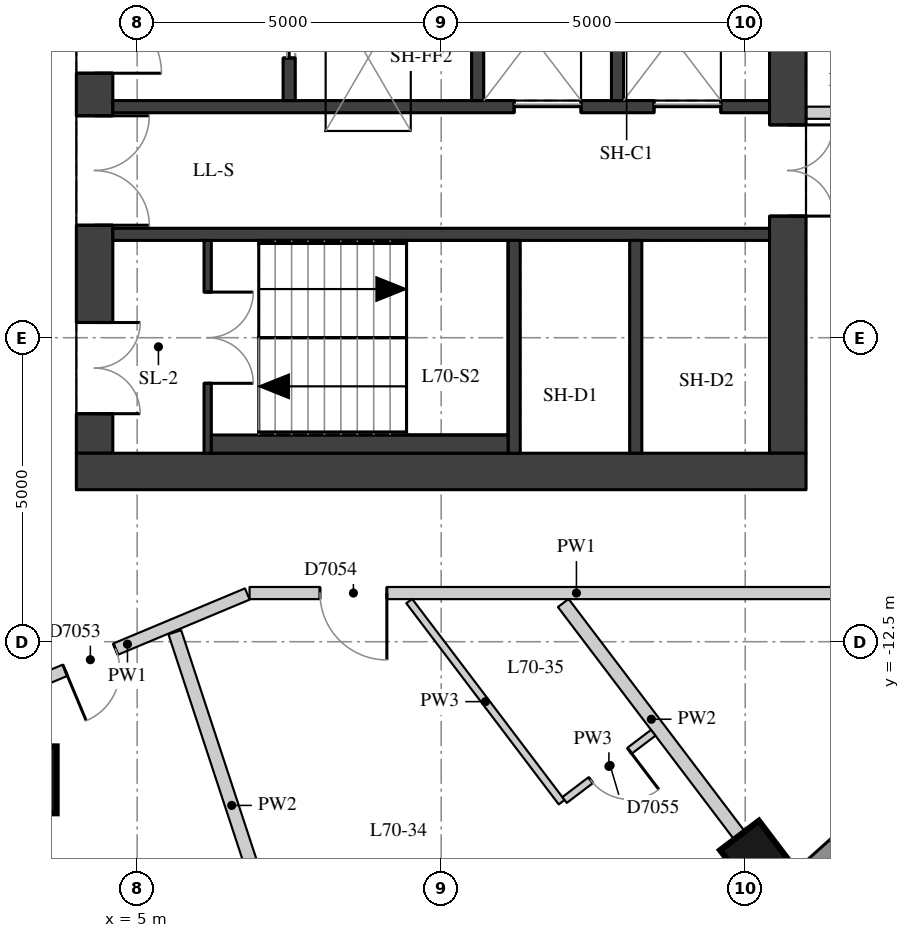
"""IFC4 building model, lengths in metres.
Left out: names, types, materials, properties, quantities, classifications, styles, units other than length and angle.
Written with IfcOpenShell. Run it as: python <this file> out.ifc"""

import sys

from ifc_helpers import new_model, si_unit, direction, frame, frame_2d, origin, origin_2d, place, context, subcontext, project, spatial, rectangle, extrude, element, fill, save


model = new_model("IFC4")
c1 = context("Model", 3, precision=1e-05, world=origin(), true_north=direction((0.0, 1.0)))
c2 = subcontext(c1, "Body", "Model", "MODEL_VIEW")
j1 = project(units=[si_unit("LENGTHUNIT", "METRE"), si_unit("PLANEANGLEUNIT", "RADIAN")], contexts=[c1])
p1 = place(None, origin())
s1 = spatial("IfcSite", under=j1, at=p1, CompositionType="ELEMENT")
p2 = place(p1, origin())
s2 = spatial("IfcBuilding", under=s1, at=p2, CompositionType="ELEMENT")
p3 = place(p2, frame((0.0, 0.0, 246.5)))
s3 = spatial("IfcBuildingStorey", under=s2, at=p3, CompositionType="ELEMENT", Elevation=246.5)
p4 = place(p3, frame((15.359, -16.285, 0.0), z_axis=(0.0, 0.0, 1.0), x_axis=(0.604020073066, -0.796969103123, 0.0)))
e1 = element("IfcColumn", 1, at=p4, inside=s3, PredefinedType="COLUMN", context=c2, shape_type="SweptSolid", body=[
    extrude(rectangle(XDim=1.5, YDim=0.8, at=origin_2d()), origin(), (0.0, 0.0, 1.0), 3.3),
])
p5 = place(p3, frame((3.126, -14.772, 0.0), z_axis=(0.0, 0.0, 1.0), x_axis=(1.0, 0.0, 0.0)))
e2 = element("IfcColumn", 2, at=p5, inside=s3, PredefinedType="COLUMN", context=c2, shape_type="SweptSolid", body=[
    extrude(rectangle(XDim=1.1, YDim=1.1, at=origin_2d()), origin(), (0.0, 0.0, 1.0), 3.3),
])
p6 = place(p3, frame((15.959, -16.448, 0.0), z_axis=(0.0, 0.0, 1.0), x_axis=(0.743166014219, 0.669107073128, 0.0)))
e3 = element("IfcWall", 3, at=p6, inside=s3, PredefinedType="SOLIDWALL", context=c2, shape_type="SweptSolid", body=[
    extrude(rectangle(XDim=3.316, YDim=0.45, at=frame_2d((1.658, 0.0))), origin(), (0.0, 0.0, 1.0), 3.02),
])
p7 = place(p3, frame((4.3, -9.4, 0.0), z_axis=(0.0, 0.0, 1.0), x_axis=(0.0, 1.0, 0.0)))
e4 = element("IfcWall", 4, at=p7, inside=s3, PredefinedType="SHEAR", context=c2, shape_type="SweptSolid", body=[
    extrude(rectangle(XDim=18.8, YDim=0.6, at=frame_2d((9.4, 0.0))), origin(), (0.0, 0.0, 1.0), 3.02),
])
p8 = place(p7, frame((0.65, 0.0, 0.0)))
e5 = element("IfcOpeningElement", 5, at=p8, cuts=e4, PredefinedType="OPENING", context=c2, shape_type="SweptSolid", body=[
    extrude(rectangle(XDim=1.5, YDim=2.1, at=frame_2d((0.75, 1.05))), frame((0.0, 0.31, 0.0), z_axis=(0.0, -1.0, 0.0), x_axis=(1.0, 0.0, 0.0)), (0.0, 0.0, 1.0), 0.62),
])
p9 = place(p7, frame((3.75, 0.0, 0.0)))
e6 = element("IfcOpeningElement", 6, at=p9, cuts=e4, PredefinedType="OPENING", context=c2, shape_type="SweptSolid", body=[
    extrude(rectangle(XDim=1.8, YDim=2.1, at=frame_2d((0.9, 1.05))), frame((0.0, 0.31, 0.0), z_axis=(0.0, -1.0, 0.0), x_axis=(1.0, 0.0, 0.0)), (0.0, 0.0, 1.0), 0.62),
])
p10 = place(p7, frame((6.25, 0.0, 0.0)))
e7 = element("IfcOpeningElement", 7, at=p10, cuts=e4, PredefinedType="OPENING", context=c2, shape_type="SweptSolid", body=[
    extrude(rectangle(XDim=1.1, YDim=2.1, at=frame_2d((0.55, 1.05))), frame((0.0, 0.31, 0.0), z_axis=(0.0, -1.0, 0.0), x_axis=(1.0, 0.0, 0.0)), (0.0, 0.0, 1.0), 0.62),
])
p11 = place(p7, frame((8.9, 0.0, 0.0)))
e8 = element("IfcOpeningElement", 8, at=p11, cuts=e4, PredefinedType="OPENING", context=c2, shape_type="SweptSolid", body=[
    extrude(rectangle(XDim=1.0, YDim=2.1, at=frame_2d((0.5, 1.05))), frame((0.0, 0.31, 0.0), z_axis=(0.0, -1.0, 0.0), x_axis=(1.0, 0.0, 0.0)), (0.0, 0.0, 1.0), 0.62),
])
p12 = place(p7, frame((11.45, 0.0, 0.0)))
e9 = element("IfcOpeningElement", 9, at=p12, cuts=e4, PredefinedType="OPENING", context=c2, shape_type="SweptSolid", body=[
    extrude(rectangle(XDim=1.1, YDim=2.1, at=frame_2d((0.55, 1.05))), frame((0.0, 0.31, 0.0), z_axis=(0.0, -1.0, 0.0), x_axis=(1.0, 0.0, 0.0)), (0.0, 0.0, 1.0), 0.62),
])
p13 = place(p7, frame((13.25, 0.0, 0.0)))
e10 = element("IfcOpeningElement", 10, at=p13, cuts=e4, PredefinedType="OPENING", context=c2, shape_type="SweptSolid", body=[
    extrude(rectangle(XDim=1.8, YDim=2.1, at=frame_2d((0.9, 1.05))), frame((0.0, 0.31, 0.0), z_axis=(0.0, -1.0, 0.0), x_axis=(1.0, 0.0, 0.0)), (0.0, 0.0, 1.0), 0.62),
])
p14 = place(p7, frame((16.65, 0.0, 0.0)))
e11 = element("IfcOpeningElement", 11, at=p14, cuts=e4, PredefinedType="OPENING", context=c2, shape_type="SweptSolid", body=[
    extrude(rectangle(XDim=1.5, YDim=2.1, at=frame_2d((0.75, 1.05))), frame((0.0, 0.31, 0.0), z_axis=(0.0, -1.0, 0.0), x_axis=(1.0, 0.0, 0.0)), (0.0, 0.0, 1.0), 0.62),
])
p15 = place(p3, frame((15.7, -9.4, 0.0), z_axis=(0.0, 0.0, 1.0), x_axis=(0.0, 1.0, 0.0)))
e12 = element("IfcWall", 12, at=p15, inside=s3, PredefinedType="SHEAR", context=c2, shape_type="SweptSolid", body=[
    extrude(rectangle(XDim=18.8, YDim=0.6, at=frame_2d((9.4, 0.0))), origin(), (0.0, 0.0, 1.0), 3.02),
])
p16 = place(p15, frame((13.4, 0.0, 0.0)))
e13 = element("IfcOpeningElement", 13, at=p16, cuts=e12, PredefinedType="OPENING", context=c2, shape_type="SweptSolid", body=[
    extrude(rectangle(XDim=1.5, YDim=2.1, at=frame_2d((0.75, 1.05))), frame((0.0, 0.31, 0.0), z_axis=(0.0, -1.0, 0.0), x_axis=(1.0, 0.0, 0.0)), (0.0, 0.0, 1.0), 0.62),
])
p17 = place(p15, frame((3.9, 0.0, 0.0)))
e14 = element("IfcOpeningElement", 14, at=p17, cuts=e12, PredefinedType="OPENING", context=c2, shape_type="SweptSolid", body=[
    extrude(rectangle(XDim=1.5, YDim=2.1, at=frame_2d((0.75, 1.05))), frame((0.0, 0.31, 0.0), z_axis=(0.0, -1.0, 0.0), x_axis=(1.0, 0.0, 0.0)), (0.0, 0.0, 1.0), 0.62),
])
p18 = place(p3, frame((4.0, -9.7, 0.0), z_axis=(0.0, 0.0, 1.0), x_axis=(1.0, 0.0, 0.0)))
e15 = element("IfcWall", 15, at=p18, inside=s3, PredefinedType="SHEAR", context=c2, shape_type="SweptSolid", body=[
    extrude(rectangle(XDim=12.0, YDim=0.6, at=frame_2d((6.0, 0.0))), origin(), (0.0, 0.0, 1.0), 3.02),
])
p19 = place(p3, frame((4.6, -3.7, 0.0), z_axis=(0.0, 0.0, 1.0), x_axis=(1.0, 0.0, 0.0)))
e16 = element("IfcWall", 16, at=p19, inside=s3, PredefinedType="SHEAR", context=c2, shape_type="SweptSolid", body=[
    extrude(rectangle(XDim=10.8, YDim=0.2, at=frame_2d((5.4, 0.0))), origin(), (0.0, 0.0, 1.0), 3.02),
])
p20 = place(p19, frame((6.6, 0.0, 0.0)))
e17 = element("IfcOpeningElement", 17, at=p20, cuts=e16, PredefinedType="OPENING", context=c2, shape_type="SweptSolid", body=[
    extrude(rectangle(XDim=1.1, YDim=2.1, at=frame_2d((0.55, 1.05))), frame((0.0, 0.11, 0.0), z_axis=(0.0, -1.0, 0.0), x_axis=(1.0, 0.0, 0.0)), (0.0, 0.0, 1.0), 0.22),
])
p21 = place(p19, frame((8.9, 0.0, 0.0)))
e18 = element("IfcOpeningElement", 18, at=p21, cuts=e16, PredefinedType="OPENING", context=c2, shape_type="SweptSolid", body=[
    extrude(rectangle(XDim=1.1, YDim=2.1, at=frame_2d((0.55, 1.05))), frame((0.0, 0.11, 0.0), z_axis=(0.0, -1.0, 0.0), x_axis=(1.0, 0.0, 0.0)), (0.0, 0.0, 1.0), 0.22),
])
p22 = place(p3, frame((4.6, -5.8, 0.0), z_axis=(0.0, 0.0, 1.0), x_axis=(1.0, 0.0, 0.0)))
e19 = element("IfcWall", 19, at=p22, inside=s3, PredefinedType="SHEAR", context=c2, shape_type="SweptSolid", body=[
    extrude(rectangle(XDim=10.8, YDim=0.2, at=frame_2d((5.4, 0.0))), origin(), (0.0, 0.0, 1.0), 3.02),
])
for number, where, z_axis, x_axis in (
    (20, (11.2, -9.4, 0.0), (0.0, 0.0, 1.0), (0.0, 1.0, 0.0)),
    (21, (13.2, -9.4, 0.0), (0.0, 0.0, 1.0), (0.0, 1.0, 0.0)),
):
    element("IfcWall", number, at=place(p3, frame(where, z_axis=z_axis, x_axis=x_axis)), inside=s3, PredefinedType="SHEAR", context=c2, shape_type="SweptSolid", body=[
        extrude(rectangle(XDim=3.5, YDim=0.2, at=frame_2d((1.75, 0.0))), origin(), (0.0, 0.0, 1.0), 3.02),
    ])
p23 = place(p3, frame((7.5, -3.6, 0.0), z_axis=(0.0, 0.0, 1.0), x_axis=(0.0, 1.0, 0.0)))
e22 = element("IfcWall", 22, at=p23, inside=s3, PredefinedType="SHEAR", context=c2, shape_type="SweptSolid", body=[
    extrude(rectangle(XDim=2.5, YDim=0.2, at=frame_2d((1.25, 0.0))), origin(), (0.0, 0.0, 1.0), 3.02),
])
p24 = place(p23, frame((0.7, 0.0, 0.0)))
e23 = element("IfcOpeningElement", 23, at=p24, cuts=e22, PredefinedType="OPENING", context=c2, shape_type="SweptSolid", body=[
    extrude(rectangle(XDim=1.1, YDim=2.1, at=frame_2d((0.55, 1.05))), frame((0.0, 0.11, 0.0), z_axis=(0.0, -1.0, 0.0), x_axis=(1.0, 0.0, 0.0)), (0.0, 0.0, 1.0), 0.22),
])
for number, where, z_axis, x_axis in (
    (24, (10.6, -3.6, 0.0), (0.0, 0.0, 1.0), (0.0, 1.0, 0.0)),
    (25, (12.9, -3.6, 0.0), (0.0, 0.0, 1.0), (0.0, 1.0, 0.0)),
):
    element("IfcWall", number, at=place(p3, frame(where, z_axis=z_axis, x_axis=x_axis)), inside=s3, PredefinedType="SHEAR", context=c2, shape_type="SweptSolid", body=[
        extrude(rectangle(XDim=2.5, YDim=0.2, at=frame_2d((1.25, 0.0))), origin(), (0.0, 0.0, 1.0), 3.02),
    ])
p25 = place(p3, frame((6.16, -9.4, 0.0), z_axis=(0.0, 0.0, 1.0), x_axis=(0.0, 1.0, 0.0)))
e26 = element("IfcWall", 26, at=p25, inside=s3, PredefinedType="SHEAR", context=c2, shape_type="SweptSolid", body=[
    extrude(rectangle(XDim=3.5, YDim=0.12, at=frame_2d((1.75, 0.0))), origin(), (0.0, 0.0, 1.0), 3.02),
])
p26 = place(p25, frame((1.15, 0.0, 0.0)))
e27 = element("IfcOpeningElement", 27, at=p26, cuts=e26, PredefinedType="OPENING", context=c2, shape_type="SweptSolid", body=[
    extrude(rectangle(XDim=1.5, YDim=2.1, at=frame_2d((0.75, 1.05))), frame((0.0, 0.07, 0.0), z_axis=(0.0, -1.0, 0.0), x_axis=(1.0, 0.0, 0.0)), (0.0, 0.0, 1.0), 0.14),
])
p27 = place(p3, frame((6.22, -9.25, 0.0), z_axis=(0.0, 0.0, 1.0), x_axis=(1.0, 0.0, 0.0)))
e28 = element("IfcWall", 28, at=p27, inside=s3, PredefinedType="PARTITIONING", context=c2, shape_type="SweptSolid", body=[
    extrude(rectangle(XDim=4.88, YDim=0.3, at=frame_2d((2.44, 0.0))), origin(), (0.0, 0.0, 1.0), 3.02),
])
p28 = place(p3, frame((17.6, -11.7, 0.0), z_axis=(0.0, 0.0, 1.0), x_axis=(-1.0, 0.0, 0.0)))
e29 = element("IfcWall", 29, at=p28, inside=s3, PredefinedType="PARTITIONING", context=c2, shape_type="SweptSolid", body=[
    extrude(rectangle(XDim=10.751, YDim=0.2, at=frame_2d((5.375, 0.0))), origin(), (0.0, 0.0, 1.0), 3.02),
])
p29 = place(p28, frame((8.493, 0.0, 0.0)))
e30 = element("IfcOpeningElement", 30, at=p29, cuts=e29, PredefinedType="OPENING", context=c2, shape_type="SweptSolid", body=[
    extrude(rectangle(XDim=1.1, YDim=2.1, at=frame_2d((0.55, 1.05))), frame((0.0, 0.11, 0.0), z_axis=(0.0, -1.0, 0.0), x_axis=(1.0, 0.0, 0.0)), (0.0, 0.0, 1.0), 0.22),
])
p30 = place(p3, frame((6.812, -11.716, 0.0), z_axis=(0.0, 0.0, 1.0), x_axis=(-0.922465594323, -0.386079301817, 0.0)))
e31 = element("IfcWall", 31, at=p30, inside=s3, PredefinedType="PARTITIONING", context=c2, shape_type="SweptSolid", body=[
    extrude(rectangle(XDim=4.273, YDim=0.2, at=frame_2d((2.137, 0.0))), origin(), (0.0, 0.0, 1.0), 3.02),
])
p31 = place(p30, frame((2.349, 0.0, 0.0)))
e32 = element("IfcOpeningElement", 32, at=p31, cuts=e31, PredefinedType="OPENING", context=c2, shape_type="SweptSolid", body=[
    extrude(rectangle(XDim=0.9, YDim=2.1, at=frame_2d((0.45, 1.05))), frame((0.0, 0.11, 0.0), z_axis=(0.0, -1.0, 0.0), x_axis=(1.0, 0.0, 0.0)), (0.0, 0.0, 1.0), 0.22),
])
p32 = place(p3, frame((16.004, -3.8, 0.0), z_axis=(0.0, 0.0, 1.0), x_axis=(1.0, 0.0, 0.0)))
e33 = element("IfcWall", 33, at=p32, inside=s3, PredefinedType="PARTITIONING", context=c2, shape_type="SweptSolid", body=[
    extrude(rectangle(XDim=1.596, YDim=0.2, at=frame_2d((0.798, 0.0))), origin(), (0.0, 0.0, 1.0), 2.57),
])
p33 = place(p3, frame((3.758, -18.944, 0.0), z_axis=(0.0, 0.0, 1.0), x_axis=(-0.157259396774, 0.987557331058, 0.0)))
e34 = element("IfcWall", 34, at=p33, inside=s3, PredefinedType="PARTITIONING", context=c2, shape_type="SweptSolid", body=[
    extrude(rectangle(XDim=5.549, YDim=0.22, at=frame_2d((2.774, 0.0))), origin(), (0.0, 0.0, 1.0), 2.57),
])
p34 = place(p3, frame((7.492, -18.04, 0.0), z_axis=(0.0, 0.0, 1.0), x_axis=(-0.312328122622, 0.949974285873, 0.0)))
e35 = element("IfcWall", 35, at=p34, inside=s3, PredefinedType="PARTITIONING", context=c2, shape_type="SweptSolid", body=[
    extrude(rectangle(XDim=5.996, YDim=0.22, at=frame_2d((2.998, 0.0))), origin(), (0.0, 0.0, 1.0), 3.02),
])
p35 = place(p3, frame((14.906, -15.687, 0.0), z_axis=(0.0, 0.0, 1.0), x_axis=(-0.604046750172, 0.796948883936, 0.0)))
e36 = element("IfcWall", 36, at=p35, inside=s3, PredefinedType="PARTITIONING", context=c2, shape_type="SweptSolid", body=[
    extrude(rectangle(XDim=4.798, YDim=0.22, at=frame_2d((2.399, 0.0))), origin(), (0.0, 0.0, 1.0), 3.02),
])
p36 = place(p3, frame((9.474, -11.832, 0.0), z_axis=(0.0, 0.0, 1.0), x_axis=(0.604029811985, -0.796961721938, 0.0)))
e37 = element("IfcWall", 37, at=p36, inside=s3, PredefinedType="PARTITIONING", context=c2, shape_type="SweptSolid", body=[
    extrude(rectangle(XDim=4.151, YDim=0.12, at=frame_2d((2.075, 0.0))), origin(), (0.0, 0.0, 1.0), 3.02),
])
p37 = place(p3, frame((12.029, -15.104, 0.0), z_axis=(0.0, 0.0, 1.0), x_axis=(0.796883918959, 0.60413245212, 0.0)))
e38 = element("IfcWall", 38, at=p37, inside=s3, PredefinedType="PARTITIONING", context=c2, shape_type="SweptSolid", body=[
    extrude(rectangle(XDim=1.83, YDim=0.12, at=frame_2d((0.915, 0.0))), origin(), (0.0, 0.0, 1.0), 3.02),
])
p38 = place(p37, frame((0.54, 0.0, 0.0)))
e39 = element("IfcOpeningElement", 39, at=p38, cuts=e38, PredefinedType="OPENING", context=c2, shape_type="SweptSolid", body=[
    extrude(rectangle(XDim=0.8, YDim=2.1, at=frame_2d((0.4, 1.05))), frame((0.0, 0.07, 0.0), z_axis=(0.0, -1.0, 0.0), x_axis=(1.0, 0.0, 0.0)), (0.0, 0.0, 1.0), 0.14),
])
p39 = place(p8, origin())
e40 = element("IfcDoor", 40, at=p39, inside=s3, OperationType="DOUBLE_DOOR_SINGLE_SWING", PredefinedType="DOOR", context=c2, shape_type="SweptSolid", body=[
    extrude(rectangle(XDim=1.5, YDim=2.1, at=frame_2d((0.75, 1.05))), frame((0.0, 0.025, 0.0), z_axis=(0.0, -1.0, 0.0), x_axis=(1.0, 0.0, 0.0)), (0.0, 0.0, 1.0), 0.05),
])
fill(e5, e40)
p40 = place(p9, origin())
e41 = element("IfcDoor", 41, at=p40, inside=s3, OperationType="DOUBLE_DOOR_SINGLE_SWING", PredefinedType="DOOR", context=c2, shape_type="SweptSolid", body=[
    extrude(rectangle(XDim=1.8, YDim=2.1, at=frame_2d((0.9, 1.05))), frame((0.0, 0.025, 0.0), z_axis=(0.0, -1.0, 0.0), x_axis=(1.0, 0.0, 0.0)), (0.0, 0.0, 1.0), 0.05),
])
fill(e6, e41)
p41 = place(p10, origin())
e42 = element("IfcDoor", 42, at=p41, inside=s3, OperationType="SINGLE_SWING_RIGHT", PredefinedType="DOOR", context=c2, shape_type="SweptSolid", body=[
    extrude(rectangle(XDim=1.1, YDim=2.1, at=frame_2d((0.55, 1.05))), frame((0.0, 0.025, 0.0), z_axis=(0.0, -1.0, 0.0), x_axis=(1.0, 0.0, 0.0)), (0.0, 0.0, 1.0), 0.05),
])
fill(e7, e42)
p42 = place(p17, origin())
e43 = element("IfcDoor", 43, at=p42, inside=s3, OperationType="DOUBLE_DOOR_SINGLE_SWING", PredefinedType="DOOR", context=c2, shape_type="SweptSolid", body=[
    extrude(rectangle(XDim=1.5, YDim=2.1, at=frame_2d((0.75, 1.05))), frame((0.0, 0.025, 0.0), z_axis=(0.0, -1.0, 0.0), x_axis=(1.0, 0.0, 0.0)), (0.0, 0.0, 1.0), 0.05),
])
fill(e14, e43)
p43 = place(p26, origin())
e44 = element("IfcDoor", 44, at=p43, inside=s3, OperationType="DOUBLE_DOOR_SINGLE_SWING", PredefinedType="DOOR", context=c2, shape_type="SweptSolid", body=[
    extrude(rectangle(XDim=1.5, YDim=2.1, at=frame_2d((0.75, 1.05))), frame((0.0, 0.025, 0.0), z_axis=(0.0, -1.0, 0.0), x_axis=(1.0, 0.0, 0.0)), (0.0, 0.0, 1.0), 0.05),
])
fill(e27, e44)
p44 = place(p20, origin())
e45 = element("IfcDoor", 45, at=p44, inside=s3, OperationType="DOUBLE_DOOR_SLIDING", PredefinedType="DOOR", context=c2, shape_type="SweptSolid", body=[
    extrude(rectangle(XDim=1.1, YDim=2.1, at=frame_2d((0.55, 1.05))), frame((0.0, 0.025, 0.0), z_axis=(0.0, -1.0, 0.0), x_axis=(1.0, 0.0, 0.0)), (0.0, 0.0, 1.0), 0.05),
])
fill(e17, e45)
p45 = place(p21, origin())
e46 = element("IfcDoor", 46, at=p45, inside=s3, OperationType="DOUBLE_DOOR_SLIDING", PredefinedType="DOOR", context=c2, shape_type="SweptSolid", body=[
    extrude(rectangle(XDim=1.1, YDim=2.1, at=frame_2d((0.55, 1.05))), frame((0.0, 0.025, 0.0), z_axis=(0.0, -1.0, 0.0), x_axis=(1.0, 0.0, 0.0)), (0.0, 0.0, 1.0), 0.05),
])
fill(e18, e46)
p46 = place(p24, origin())
e47 = element("IfcDoor", 47, at=p46, inside=s3, OperationType="DOUBLE_DOOR_SLIDING", PredefinedType="DOOR", context=c2, shape_type="SweptSolid", body=[
    extrude(rectangle(XDim=1.1, YDim=2.1, at=frame_2d((0.55, 1.05))), frame((0.0, 0.025, 0.0), z_axis=(0.0, -1.0, 0.0), x_axis=(1.0, 0.0, 0.0)), (0.0, 0.0, 1.0), 0.05),
])
fill(e23, e47)
p47 = place(p31, origin())
e48 = element("IfcDoor", 48, at=p47, inside=s3, OperationType="SINGLE_SWING_RIGHT", PredefinedType="DOOR", context=c2, shape_type="SweptSolid", body=[
    extrude(rectangle(XDim=0.9, YDim=2.1, at=frame_2d((0.45, 1.05))), frame((0.0, 0.025, 0.0), z_axis=(0.0, -1.0, 0.0), x_axis=(1.0, 0.0, 0.0)), (0.0, 0.0, 1.0), 0.05),
])
fill(e32, e48)
p48 = place(p29, origin())
e49 = element("IfcDoor", 49, at=p48, inside=s3, OperationType="SINGLE_SWING_LEFT", PredefinedType="DOOR", context=c2, shape_type="SweptSolid", body=[
    extrude(rectangle(XDim=1.1, YDim=2.1, at=frame_2d((0.55, 1.05))), frame((0.0, 0.025, 0.0), z_axis=(0.0, -1.0, 0.0), x_axis=(1.0, 0.0, 0.0)), (0.0, 0.0, 1.0), 0.05),
])
fill(e30, e49)
p49 = place(p38, origin())
e50 = element("IfcDoor", 50, at=p49, inside=s3, OperationType="SINGLE_SWING_LEFT", PredefinedType="DOOR", context=c2, shape_type="SweptSolid", body=[
    extrude(rectangle(XDim=0.8, YDim=2.1, at=frame_2d((0.4, 1.05))), frame((0.0, 0.025, 0.0), z_axis=(0.0, -1.0, 0.0), x_axis=(1.0, 0.0, 0.0)), (0.0, 0.0, 1.0), 0.05),
])
fill(e39, e50)
save(model, sys.argv[1])
